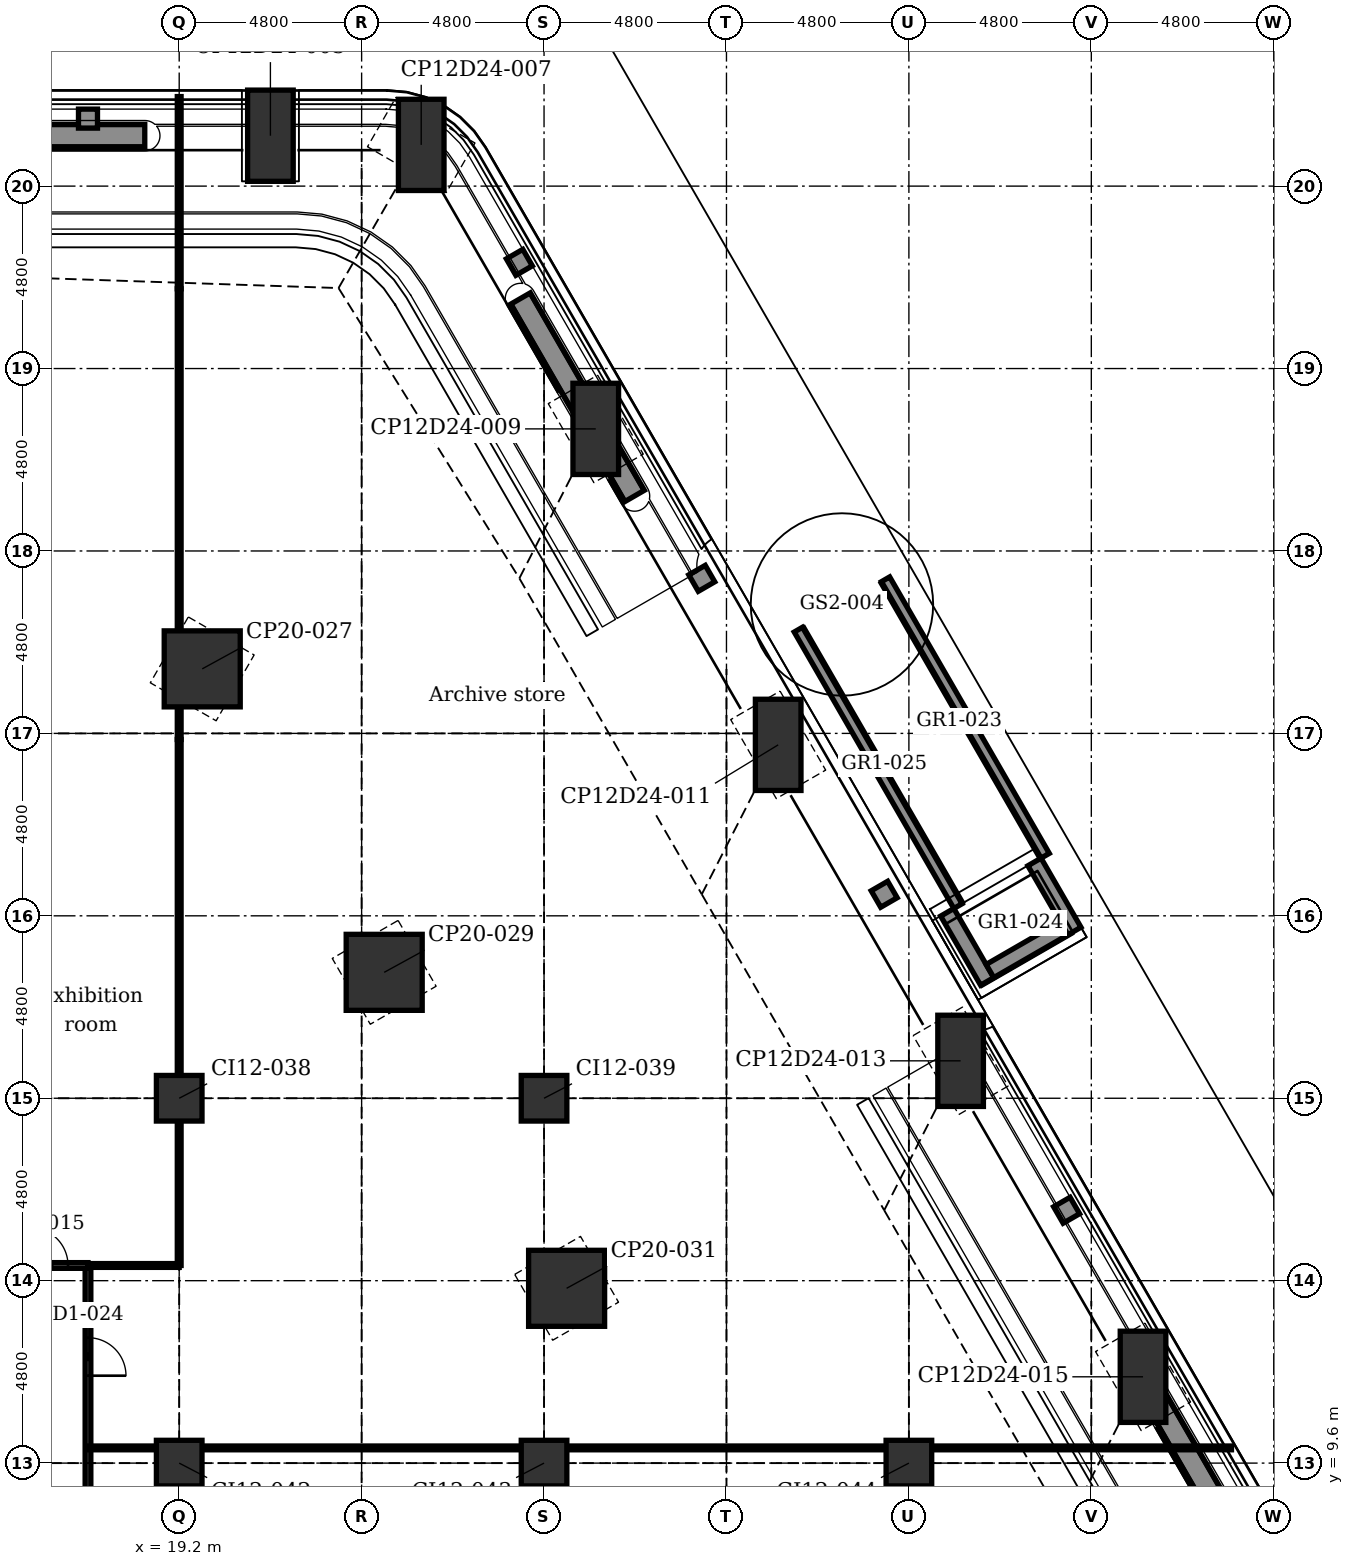
"""IFC4 building model, lengths in metres.
Left out: names, types, materials, properties, quantities, classifications, styles, units other than length and angle.
Written with IfcOpenShell. Run it as: python <this file> out.ifc"""

import sys

from ifc_helpers import new_model, si_unit, direction, frame, frame_2d, origin, origin_2d, place, context, subcontext, project, spatial, polyline, rectangle, outline, extrude, element, fill, save


model = new_model("IFC4")
c1 = context("Model", 3, precision=1e-05, world=origin(), true_north=direction((0.0, 1.0)))
c2 = subcontext(c1, "Body", "Model", "MODEL_VIEW")
j1 = project(units=[si_unit("LENGTHUNIT", "METRE"), si_unit("PLANEANGLEUNIT", "RADIAN")], contexts=[c1])
p1 = place(None, origin())
s1 = spatial("IfcSite", under=j1, at=p1, CompositionType="ELEMENT")
p2 = place(p1, origin())
s2 = spatial("IfcBuilding", under=s1, at=p2, CompositionType="ELEMENT")
p3 = place(p2, frame((0.0, 0.0, 7.0)))
s3 = spatial("IfcBuildingStorey", under=s2, at=p3, CompositionType="ELEMENT", Elevation=7.0)
for number, where, z_axis, x_axis in (
    (1, (21.6, 44.526, -0.3), (0.0, 0.0, 1.0), (1.0, 0.0, 0.0)),
    (2, (25.568, 44.285, -0.3), (0.0, 0.0, 1.0), (0.5, 0.866, 0.0)),
    (3, (30.161, 36.812, -0.3), (0.0, 0.0, 1.0), (0.866, 0.5, 0.0)),
    (4, (34.961, 28.499, -0.3), (0.0, 0.0, 1.0), (0.866, 0.5, 0.0)),
    (5, (39.761, 20.185, -0.3), (0.0, 0.0, 1.0), (0.866, 0.5, 0.0)),
    (6, (44.561, 11.871, -0.3), (0.0, 0.0, 1.0), (0.866, 0.5, 0.0)),
):
    element("IfcColumn", number, at=place(p3, frame(where, z_axis=z_axis, x_axis=x_axis)), inside=s3, PredefinedType="COLUMN", context=c2, shape_type="SweptSolid", body=[
        extrude(rectangle(XDim=1.2, YDim=2.4, at=origin_2d()), origin(), (0.0, 0.0, 1.0), 5.4),
    ])
for number, where, z_axis, x_axis in (
    (7, (19.806, 30.498, -0.3), (0.0, 0.0, 1.0), (0.5, 0.866, 0.0)),
    (8, (24.594, 22.513, -0.3), (0.0, 0.0, 1.0), (0.866, 0.5, 0.0)),
    (9, (29.394, 14.199, -0.3), (0.0, 0.0, 1.0), (0.866, 0.5, 0.0)),
):
    element("IfcColumn", number, at=place(p3, frame(where, z_axis=z_axis, x_axis=x_axis)), inside=s3, PredefinedType="COLUMN", context=c2, shape_type="SweptSolid", body=[
        extrude(rectangle(XDim=2.0, YDim=2.0, at=origin_2d()), origin(), (0.0, 0.0, 1.0), 5.4),
    ])
for number, where, z_axis, x_axis in (
    (10, (19.2, 9.6, -0.3), (0.0, 0.0, 1.0), (1.0, 0.0, 0.0)),
    (11, (19.2, 19.2, -0.3), (0.0, 0.0, 1.0), (1.0, 0.0, 0.0)),
    (12, (28.8, 9.6, -0.3), (0.0, 0.0, 1.0), (1.0, 0.0, 0.0)),
    (13, (28.8, 19.2, -0.3), (0.0, 0.0, 1.0), (1.0, 0.0, 0.0)),
    (14, (38.4, 9.6, -0.3), (0.0, 0.0, 1.0), (1.0, 0.0, 0.0)),
):
    element("IfcColumn", number, at=place(p3, frame(where, z_axis=z_axis, x_axis=x_axis)), inside=s3, PredefinedType="COLUMN", context=c2, shape_type="SweptSolid", body=[
        extrude(rectangle(XDim=1.2, YDim=1.2, at=origin_2d()), origin(), (0.0, 0.0, 1.0), 5.4),
    ])
for number, where, z_axis, x_axis in (
    (15, (12.294, 44.526, 5.4), (0.0, 0.0, 1.0), (1.0, 0.0, 0.0)),
    (16, (44.708, 11.616, 5.4), (0.0, 0.0, 1.0), (0.5, -0.866, 0.0)),
    (17, (28.18, 40.243, 5.4), (0.0, 0.0, 1.0), (0.5, -0.866, 0.0)),
):
    element("IfcWall", number, at=place(p3, frame(where, z_axis=z_axis, x_axis=x_axis)), inside=s3, PredefinedType="USERDEFINED", context=c2, shape_type="SweptSolid", body=[
        extrude(rectangle(XDim=6.0, YDim=0.6, at=frame_2d((3.0, 0.0))), origin(), (0.0, 0.0, 1.0), 0.7),
    ])
for number, where, z_axis, x_axis in (
    (18, (37.786, 32.855, 0.0), (0.0, 0.0, 1.0), (0.5, -0.866, 0.0)),
    (19, (35.491, 31.53, 0.0), (0.0, 0.0, 1.0), (0.5, -0.866, 0.0)),
):
    element("IfcWall", number, at=place(p3, frame(where, z_axis=z_axis, x_axis=x_axis)), inside=s3, PredefinedType="SOLIDWALL", context=c2, shape_type="SweptSolid", body=[
        extrude(outline(polyline([(0.0, 0.0), (8.4, 0.0), (8.4, 5.5), (0.0, 0.274), (0.0, 0.0)])), frame((0.0, 0.125, 0.0), z_axis=(0.0, -1.0, 0.0), x_axis=(1.0, 0.0, 0.0)), (0.0, 0.0, 1.0), 0.25),
    ])
for number, where, z_axis, x_axis in (
    (20, (41.705, 25.418, 0.45), (0.0, 0.0, 1.0), (0.5, -0.866, 0.0)),
    (21, (39.41, 24.093, 0.45), (0.0, 0.0, 1.0), (0.5, -0.866, 0.0)),
):
    element("IfcWall", number, at=place(p3, frame(where, z_axis=z_axis, x_axis=x_axis)), inside=s3, PredefinedType="SOLIDWALL", context=c2, shape_type="SweptSolid", body=[
        extrude(rectangle(XDim=2.1, YDim=0.4, at=frame_2d((1.05, 0.0))), origin(), (0.0, 0.0, 1.0), 4.75),
    ])
p4 = place(p3, frame((40.533, 22.547, 0.45), z_axis=(0.0, 0.0, 1.0), x_axis=(0.866017533419, 0.500013631625, 0.0)))
e22 = element("IfcWall", 22, at=p4, inside=s3, PredefinedType="SOLIDWALL", context=c2, shape_type="SweptSolid", body=[
    extrude(rectangle(XDim=2.25, YDim=0.4, at=frame_2d((1.125, 0.0))), origin(), (0.0, 0.0, 1.0), 4.75),
])
p5 = place(p3, frame((16.55, 44.976, 0.0), z_axis=(0.0, 0.0, 1.0), x_axis=(1.0, 0.0, 0.0)))
e23 = element("IfcWall", 23, at=p5, inside=s3, PredefinedType="SOLIDWALL", context=c2, shape_type="SweptSolid", body=[
    extrude(rectangle(XDim=0.5, YDim=0.5, at=frame_2d((0.25, 0.0))), origin(), (0.0, 0.0, 1.0), 4.8),
])
for number, where, z_axis, x_axis in (
    (24, (28.025, 41.41, 0.0), (0.0, 0.0, 1.0), (0.5, -0.866, 0.0)),
    (25, (32.825, 33.096, 0.0), (0.0, 0.0, 1.0), (0.5, -0.866, 0.0)),
    (26, (37.625, 24.783, 0.0), (0.0, 0.0, 1.0), (0.5, -0.866, 0.0)),
):
    element("IfcWall", number, at=place(p3, frame(where, z_axis=z_axis, x_axis=x_axis)), inside=s3, PredefinedType="SOLIDWALL", context=c2, shape_type="SweptSolid", body=[
        extrude(rectangle(XDim=0.5, YDim=0.5, at=frame_2d((0.25, 0.0))), origin(), (0.0, 0.0, 1.0), 4.8),
    ])
p6 = place(p3, frame((42.425, 16.469, 0.0), z_axis=(0.0, 0.0, 1.0), x_axis=(0.499919672301, -0.866071776036, 0.0)))
e27 = element("IfcWall", 27, at=p6, inside=s3, PredefinedType="SOLIDWALL", context=c2, shape_type="SweptSolid", body=[
    extrude(rectangle(XDim=0.5, YDim=0.5, at=frame_2d((0.25, 0.0))), origin(), (0.0, 0.0, 1.0), 4.8),
])
p7 = place(p3, frame((19.2, 31.408, 0.0), z_axis=(0.0, 0.0, 1.0), x_axis=(0.0, 1.0, 0.0)))
e28 = element("IfcWall", 28, at=p7, inside=s3, PredefinedType="PARTITIONING", context=c2, shape_type="SweptSolid", body=[
    extrude(rectangle(XDim=9.09, YDim=0.1, at=frame_2d((4.545, 0.0))), origin(), (0.0, 0.0, 1.0), 4.643),
])
p8 = place(p3, frame((19.2, 14.8, 0.0), z_axis=(0.0, 0.0, 1.0), x_axis=(0.0, 1.0, 0.0)))
e29 = element("IfcWall", 29, at=p8, inside=s3, PredefinedType="PARTITIONING", context=c2, shape_type="SweptSolid", body=[
    extrude(rectangle(XDim=3.84, YDim=0.1, at=frame_2d((1.92, 0.0))), origin(), (0.0, 0.0, 1.0), 4.693),
])
p9 = place(p3, frame((19.2, 18.64, 0.0), z_axis=(0.0, 0.0, 1.0), x_axis=(0.0, 1.0, 0.0)))
e30 = element("IfcWall", 30, at=p9, inside=s3, PredefinedType="PARTITIONING", context=c2, shape_type="SweptSolid", body=[
    extrude(rectangle(XDim=1.12, YDim=0.1, at=frame_2d((0.56, 0.0))), origin(), (0.0, 0.0, 1.0), 5.1),
])
p10 = place(p3, frame((19.2, 19.76, 0.0), z_axis=(0.0, 0.0, 1.0), x_axis=(0.0, 1.0, 0.0)))
e31 = element("IfcWall", 31, at=p10, inside=s3, PredefinedType="PARTITIONING", context=c2, shape_type="SweptSolid", body=[
    extrude(rectangle(XDim=8.88, YDim=0.1, at=frame_2d((4.44, 0.0))), origin(), (0.0, 0.0, 1.0), 4.693),
])
p11 = place(p3, frame((19.2, 28.64, 0.0), z_axis=(0.0, 0.0, 1.0), x_axis=(0.0, 1.0, 0.0)))
e32 = element("IfcWall", 32, at=p11, inside=s3, PredefinedType="PARTITIONING", context=c2, shape_type="SweptSolid", body=[
    extrude(rectangle(XDim=2.769, YDim=0.1, at=frame_2d((1.384, 0.0))), origin(), (0.0, 0.0, 1.0), 5.1),
])
p12 = place(p3, frame((19.2, 40.498, 0.0), z_axis=(0.0, 0.0, 1.0), x_axis=(0.0, 1.0, 0.0)))
e33 = element("IfcWall", 33, at=p12, inside=s3, PredefinedType="PARTITIONING", context=c2, shape_type="SweptSolid", body=[
    extrude(rectangle(XDim=5.058, YDim=0.1, at=frame_2d((2.529, 0.0))), origin(), (0.0, 0.0, 1.0), 5.1),
])
p13 = place(p3, frame((16.8, 3.95, 0.0), z_axis=(0.0, 0.0, 1.0), x_axis=(0.0, 1.0, 0.0)))
e34 = element("IfcWall", 34, at=p13, inside=s3, PredefinedType="PARTITIONING", context=c2, shape_type="SweptSolid", body=[
    extrude(rectangle(XDim=10.85, YDim=0.15, at=frame_2d((5.425, 0.0))), origin(), (0.0, 0.0, 1.0), 5.1),
])
p14 = place(p13, frame((2.45, 0.0, 0.0)))
e35 = element("IfcOpeningElement", 35, at=p14, cuts=e34, PredefinedType="OPENING", context=c2, shape_type="SweptSolid", body=[
    extrude(rectangle(XDim=1.0, YDim=2.1, at=frame_2d((0.5, 1.05))), frame((0.0, 0.085, 0.0), z_axis=(0.0, -1.0, 0.0), x_axis=(1.0, 0.0, 0.0)), (0.0, 0.0, 1.0), 0.17),
])
p15 = place(p13, frame((7.95, 0.0, 0.0)))
e36 = element("IfcOpeningElement", 36, at=p15, cuts=e34, PredefinedType="OPENING", context=c2, shape_type="SweptSolid", body=[
    extrude(rectangle(XDim=1.0, YDim=2.1, at=frame_2d((0.5, 1.05))), frame((0.0, 0.085, 0.0), z_axis=(0.0, -1.0, 0.0), x_axis=(1.0, 0.0, 0.0)), (0.0, 0.0, 1.0), 0.17),
])
p16 = place(p3, frame((16.8, 10.0, 0.0), z_axis=(0.0, 0.0, 1.0), x_axis=(1.0, 0.0, 0.0)))
e37 = element("IfcWall", 37, at=p16, inside=s3, PredefinedType="PARTITIONING", context=c2, shape_type="SweptSolid", body=[
    extrude(rectangle(XDim=30.088, YDim=0.1, at=frame_2d((15.044, 0.0))), origin(), (0.0, 0.0, 1.0), 5.1),
])
p17 = place(p3, frame((16.8, 14.8, 0.0), z_axis=(0.0, 0.0, 1.0), x_axis=(1.0, 0.0, 0.0)))
e38 = element("IfcWall", 38, at=p17, inside=s3, PredefinedType="PARTITIONING", context=c2, shape_type="SweptSolid", body=[
    extrude(rectangle(XDim=2.4, YDim=0.1, at=frame_2d((1.2, 0.0))), origin(), (0.0, 0.0, 1.0), 5.1),
])
p18 = place(p3, frame((-16.8, 14.8, 0.0), z_axis=(0.0, 0.0, 1.0), x_axis=(1.0, 0.0, 0.0)))
e39 = element("IfcWall", 39, at=p18, inside=s3, PredefinedType="PARTITIONING", context=c2, shape_type="SweptSolid", body=[
    extrude(rectangle(XDim=33.6, YDim=0.15, at=frame_2d((16.8, 0.0))), origin(), (0.0, 0.0, 1.0), 5.1),
])
p19 = place(p18, frame((15.75, 0.0, 0.0)))
e40 = element("IfcOpeningElement", 40, at=p19, cuts=e39, PredefinedType="OPENING", context=c2, shape_type="SweptSolid", body=[
    extrude(rectangle(XDim=0.9, YDim=2.1, at=frame_2d((0.45, 1.05))), frame((0.0, 0.085, 0.0), z_axis=(0.0, -1.0, 0.0), x_axis=(1.0, 0.0, 0.0)), (0.0, 0.0, 1.0), 0.17),
])
p20 = place(p18, frame((18.75, 0.0, 0.0)))
e41 = element("IfcOpeningElement", 41, at=p20, cuts=e39, PredefinedType="OPENING", context=c2, shape_type="SweptSolid", body=[
    extrude(rectangle(XDim=0.9, YDim=2.1, at=frame_2d((0.45, 1.05))), frame((0.0, 0.085, 0.0), z_axis=(0.0, -1.0, 0.0), x_axis=(1.0, 0.0, 0.0)), (0.0, 0.0, 1.0), 0.17),
])
p21 = place(p18, frame((3.375, 0.0, 0.0)))
e42 = element("IfcOpeningElement", 42, at=p21, cuts=e39, PredefinedType="OPENING", context=c2, shape_type="SweptSolid", body=[
    extrude(rectangle(XDim=1.8, YDim=2.1, at=frame_2d((0.9, 1.05))), frame((0.0, 0.085, 0.0), z_axis=(0.0, -1.0, 0.0), x_axis=(1.0, 0.0, 0.0)), (0.0, 0.0, 1.0), 0.17),
])
p22 = place(p18, frame((10.3, 0.0, 0.0)))
e43 = element("IfcOpeningElement", 43, at=p22, cuts=e39, PredefinedType="OPENING", context=c2, shape_type="SweptSolid", body=[
    extrude(rectangle(XDim=1.0, YDim=2.1, at=frame_2d((0.5, 1.05))), frame((0.0, 0.085, 0.0), z_axis=(0.0, -1.0, 0.0), x_axis=(1.0, 0.0, 0.0)), (0.0, 0.0, 1.0), 0.17),
])
p23 = place(p18, frame((23.325, 0.0, 0.0)))
e44 = element("IfcOpeningElement", 44, at=p23, cuts=e39, PredefinedType="OPENING", context=c2, shape_type="SweptSolid", body=[
    extrude(rectangle(XDim=1.8, YDim=2.1, at=frame_2d((0.9, 1.05))), frame((0.0, 0.085, 0.0), z_axis=(0.0, -1.0, 0.0), x_axis=(1.0, 0.0, 0.0)), (0.0, 0.0, 1.0), 0.17),
])
p24 = place(p18, frame((28.3, 0.0, 0.0)))
e45 = element("IfcOpeningElement", 45, at=p24, cuts=e39, PredefinedType="OPENING", context=c2, shape_type="SweptSolid", body=[
    extrude(rectangle(XDim=1.0, YDim=2.1, at=frame_2d((0.5, 1.05))), frame((0.0, 0.085, 0.0), z_axis=(0.0, -1.0, 0.0), x_axis=(1.0, 0.0, 0.0)), (0.0, 0.0, 1.0), 0.17),
])
p25 = place(p18, frame((32.075, 0.0, 0.0)))
e46 = element("IfcOpeningElement", 46, at=p25, cuts=e39, PredefinedType="OPENING", context=c2, shape_type="SweptSolid", body=[
    extrude(rectangle(XDim=1.0, YDim=2.1, at=frame_2d((0.5, 1.05))), frame((0.0, 0.085, 0.0), z_axis=(0.0, -1.0, 0.0), x_axis=(1.0, 0.0, 0.0)), (0.0, 0.0, 1.0), 0.17),
])
p26 = place(p25, origin())
e47 = element("IfcDoor", 47, at=p26, inside=s3, OperationType="SINGLE_SWING_LEFT", PredefinedType="DOOR", context=c2, shape_type="SweptSolid", body=[
    extrude(rectangle(XDim=1.0, YDim=2.1, at=frame_2d((0.5, 1.05))), frame((0.0, 0.025, 0.0), z_axis=(0.0, -1.0, 0.0), x_axis=(1.0, 0.0, 0.0)), (0.0, 0.0, 1.0), 0.05),
])
fill(e46, e47)
p27 = place(p15, frame((1.0, 0.0, 0.0), z_axis=(0.0, 0.0, 1.0), x_axis=(-1.0, 0.0, 0.0)))
e48 = element("IfcDoor", 48, at=p27, inside=s3, OperationType="SINGLE_SWING_LEFT", PredefinedType="DOOR", context=c2, shape_type="SweptSolid", body=[
    extrude(rectangle(XDim=1.0, YDim=2.1, at=frame_2d((0.5, 1.05))), frame((0.0, 0.025, 0.0), z_axis=(0.0, -1.0, 0.0), x_axis=(1.0, 0.0, 0.0)), (0.0, 0.0, 1.0), 0.05),
])
fill(e36, e48)
save(model, sys.argv[1])
